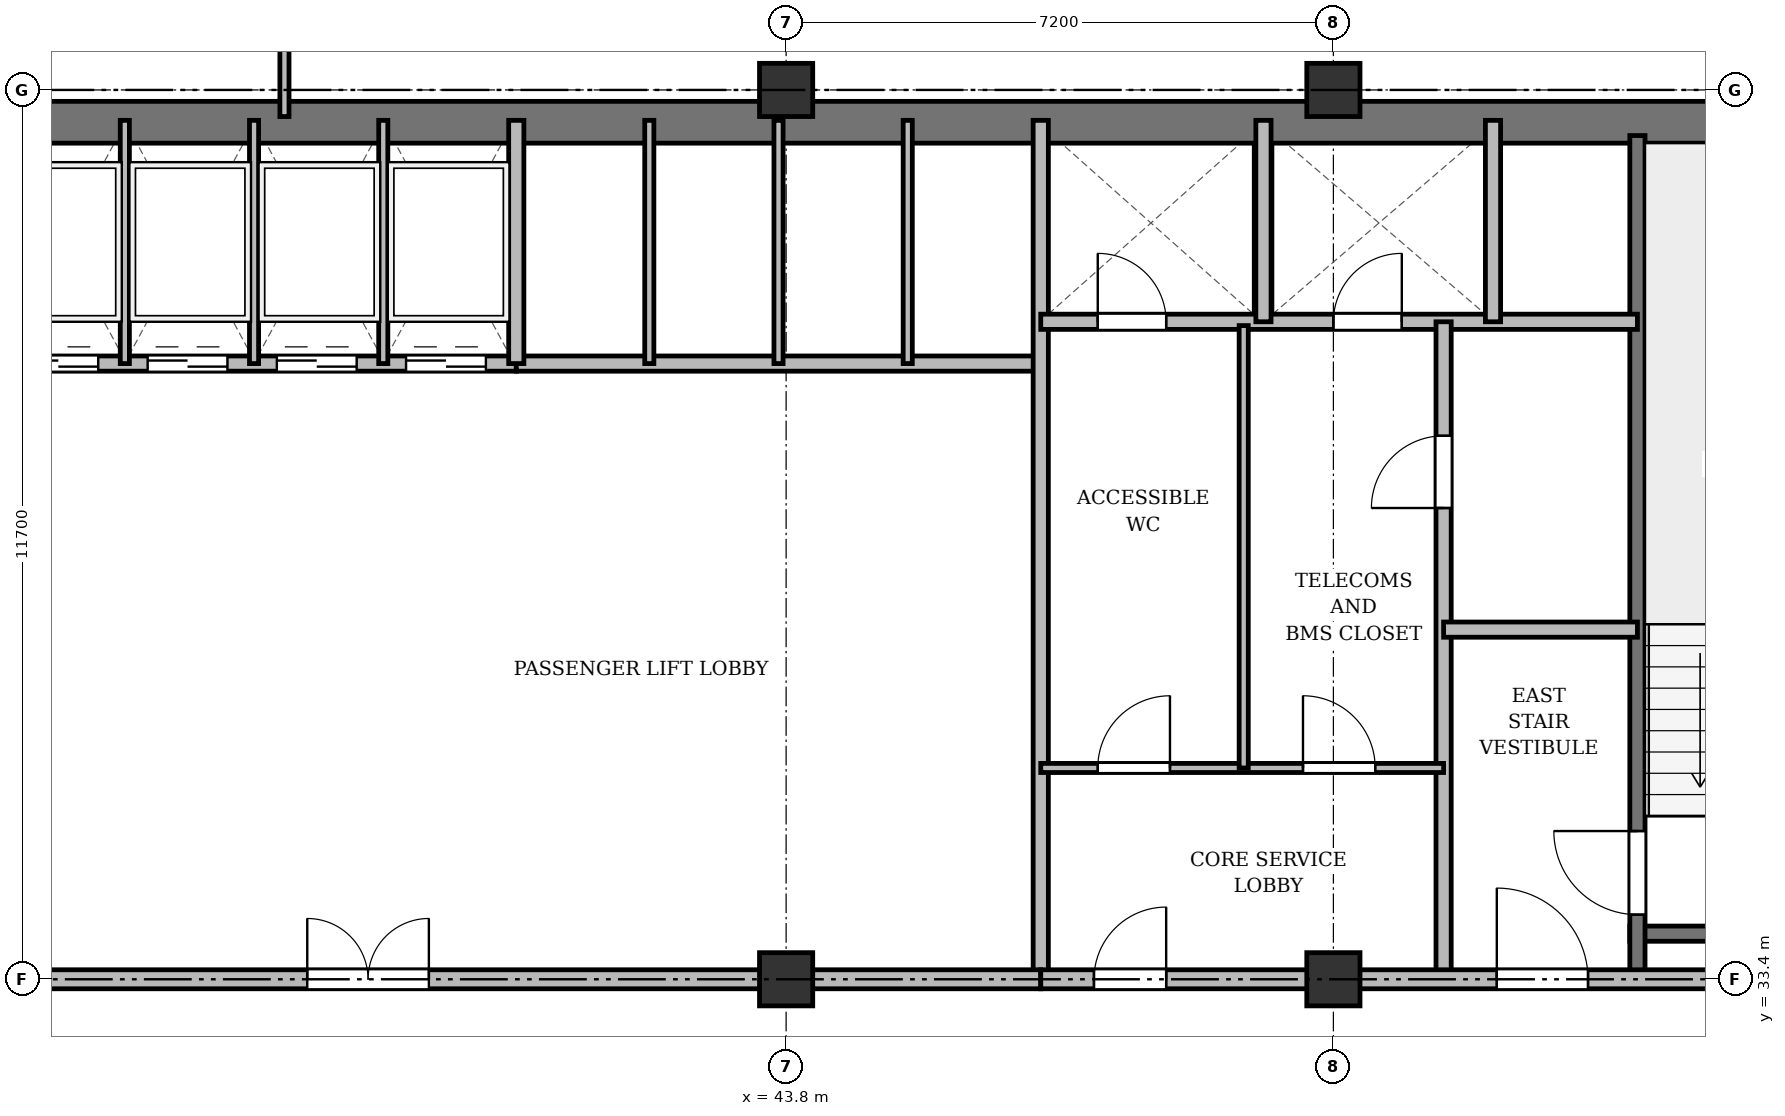
"""IFC4 building model, lengths in metres.
Left out: names, types, materials, properties, quantities, classifications, styles, units other than length and angle.
Written with IfcOpenShell. Run it as: python <this file> out.ifc"""

import sys

from ifc_helpers import new_model, si_unit, direction, frame, frame_2d, origin, origin_2d, place, context, subcontext, project, spatial, rectangle, extrude, source, transform, mapped, element, fill, save


model = new_model("IFC4")
c1 = context("Model", 3, precision=1e-05, world=origin(), true_north=direction((0.0, 1.0)))
c2 = subcontext(c1, "Body", "Model", "MODEL_VIEW")
j1 = project(units=[si_unit("LENGTHUNIT", "METRE"), si_unit("PLANEANGLEUNIT", "RADIAN")], contexts=[c1])
p1 = place(None, origin())
s1 = spatial("IfcSite", under=j1, at=p1, CompositionType="ELEMENT")
p2 = place(p1, origin())
s2 = spatial("IfcBuilding", under=s1, at=p2, CompositionType="ELEMENT")
p3 = place(p2, frame((0.0, 0.0, 171.7)))
s3 = spatial("IfcBuildingStorey", under=s2, at=p3, CompositionType="ELEMENT", Elevation=171.7)
m1 = source(origin(), c2, "Body", "SweptSolid", [
    extrude(rectangle(XDim=0.7, YDim=0.7, at=origin_2d()), origin(), (0.0, 0.0, 1.0), 3.6),
])
for number, where, z_axis, x_axis in (
    (1, (43.8, 33.4, 0.0), (0.0, 0.0, 1.0), (1.0, 0.0, 0.0)),
    (2, (43.8, 45.1, 0.0), (0.0, 0.0, 1.0), (1.0, 0.0, 0.0)),
    (3, (51.0, 33.4, 0.0), (0.0, 0.0, 1.0), (1.0, 0.0, 0.0)),
    (4, (51.0, 45.1, 0.0), (0.0, 0.0, 1.0), (1.0, 0.0, 0.0)),
):
    element("IfcColumn", number, at=place(p3, frame(where, z_axis=z_axis, x_axis=x_axis)), inside=s3, PredefinedType="COLUMN", context=c2, shape_type="MappedRepresentation", body=[
        mapped(m1, transform((0.0, 0.0, 0.0), x_axis=(1.0, 0.0, 0.0), y_axis=(0.0, 1.0, 0.0), z_axis=(0.0, 0.0, 1.0), scale=1.0)),
    ])
p4 = place(p3, frame((15.65, 44.675, 0.0), z_axis=(0.0, 0.0, 1.0), x_axis=(1.0, 0.0, 0.0)))
e5 = element("IfcWall", 5, at=p4, inside=s3, PredefinedType="SHEAR", context=c2, shape_type="SweptSolid", body=[
    extrude(rectangle(XDim=43.1, YDim=0.55, at=frame_2d((21.55, 0.0))), origin(), (0.0, 0.0, 1.0), 3.35),
])
p5 = place(p3, frame((54.9, 34.0, 0.0), z_axis=(0.0, 0.0, 1.0), x_axis=(1.0, 0.0, 0.0)))
e6 = element("IfcWall", 6, at=p5, inside=s3, PredefinedType="SHEAR", context=c2, shape_type="SweptSolid", body=[
    extrude(rectangle(XDim=3.4, YDim=0.2, at=frame_2d((1.7, 0.0))), origin(), (0.0, 0.0, 1.0), 3.35),
])
p6 = place(p3, frame((55.0, 33.4, 0.0), z_axis=(0.0, 0.0, 1.0), x_axis=(0.0, 1.0, 0.0)))
e7 = element("IfcWall", 7, at=p6, inside=s3, PredefinedType="SHEAR", context=c2, shape_type="SweptSolid", body=[
    extrude(rectangle(XDim=11.1, YDim=0.2, at=frame_2d((5.55, 0.0))), origin(), (0.0, 0.0, 1.0), 3.35),
])
p7 = place(p6, frame((0.85, 0.0, 0.0)))
e8 = element("IfcOpeningElement", 8, at=p7, cuts=e7, PredefinedType="OPENING", context=c2, shape_type="SweptSolid", body=[
    extrude(rectangle(XDim=1.1, YDim=2.15, at=frame_2d((0.55, 1.075))), frame((0.0, 0.11, 0.0), z_axis=(0.0, -1.0, 0.0), x_axis=(1.0, 0.0, 0.0)), (0.0, 0.0, 1.0), 0.22),
])
p8 = place(p3, frame((33.35, 41.5, 0.0), z_axis=(0.0, 0.0, 1.0), x_axis=(1.0, 0.0, 0.0)))
e9 = element("IfcWall", 9, at=p8, inside=s3, PredefinedType="SOLIDWALL", context=c2, shape_type="SweptSolid", body=[
    extrude(rectangle(XDim=6.9, YDim=0.2, at=frame_2d((3.45, 0.0))), origin(), (0.0, 0.0, 1.0), 3.35),
])
p9 = place(p8, frame((0.35, 0.0, 0.0)))
e10 = element("IfcOpeningElement", 10, at=p9, cuts=e9, PredefinedType="OPENING", context=c2, shape_type="SweptSolid", body=[
    extrude(rectangle(XDim=1.05, YDim=2.15, at=frame_2d((0.525, 1.075))), frame((0.0, 0.11, 0.0), z_axis=(0.0, -1.0, 0.0), x_axis=(1.0, 0.0, 0.0)), (0.0, 0.0, 1.0), 0.22),
])
p10 = place(p8, frame((2.05, 0.0, 0.0)))
e11 = element("IfcOpeningElement", 11, at=p10, cuts=e9, PredefinedType="OPENING", context=c2, shape_type="SweptSolid", body=[
    extrude(rectangle(XDim=1.05, YDim=2.15, at=frame_2d((0.525, 1.075))), frame((0.0, 0.11, 0.0), z_axis=(0.0, -1.0, 0.0), x_axis=(1.0, 0.0, 0.0)), (0.0, 0.0, 1.0), 0.22),
])
p11 = place(p8, frame((3.75, 0.0, 0.0)))
e12 = element("IfcOpeningElement", 12, at=p11, cuts=e9, PredefinedType="OPENING", context=c2, shape_type="SweptSolid", body=[
    extrude(rectangle(XDim=1.05, YDim=2.15, at=frame_2d((0.525, 1.075))), frame((0.0, 0.11, 0.0), z_axis=(0.0, -1.0, 0.0), x_axis=(1.0, 0.0, 0.0)), (0.0, 0.0, 1.0), 0.22),
])
p12 = place(p8, frame((5.45, 0.0, 0.0)))
e13 = element("IfcOpeningElement", 13, at=p12, cuts=e9, PredefinedType="OPENING", context=c2, shape_type="SweptSolid", body=[
    extrude(rectangle(XDim=1.05, YDim=2.15, at=frame_2d((0.525, 1.075))), frame((0.0, 0.11, 0.0), z_axis=(0.0, -1.0, 0.0), x_axis=(1.0, 0.0, 0.0)), (0.0, 0.0, 1.0), 0.22),
])
for number, where, z_axis, x_axis in (
    (14, (35.1, 41.5, 0.0), (0.0, 0.0, 1.0), (0.0, 1.0, 0.0)),
    (15, (36.8, 41.5, 0.0), (0.0, 0.0, 1.0), (0.0, 1.0, 0.0)),
    (16, (38.5, 41.5, 0.0), (0.0, 0.0, 1.0), (0.0, 1.0, 0.0)),
):
    element("IfcWall", number, at=place(p3, frame(where, z_axis=z_axis, x_axis=x_axis)), inside=s3, PredefinedType="PARTITIONING", context=c2, shape_type="SweptSolid", body=[
        extrude(rectangle(XDim=3.2, YDim=0.12, at=frame_2d((1.6, 0.0))), origin(), (0.0, 0.0, 1.0), 3.35),
    ])
p13 = place(p3, frame((40.25, 41.5, 0.0), z_axis=(0.0, 0.0, 1.0), x_axis=(1.0, 0.0, 0.0)))
e17 = element("IfcWall", 17, at=p13, inside=s3, PredefinedType="SOLIDWALL", context=c2, shape_type="SweptSolid", body=[
    extrude(rectangle(XDim=6.9, YDim=0.2, at=frame_2d((3.45, 0.0))), origin(), (0.0, 0.0, 1.0), 2.85),
])
p14 = place(p3, frame((40.25, 41.5, 0.0), z_axis=(0.0, 0.0, 1.0), x_axis=(0.0, 1.0, 0.0)))
e18 = element("IfcWall", 18, at=p14, inside=s3, PredefinedType="SOLIDWALL", context=c2, shape_type="SweptSolid", body=[
    extrude(rectangle(XDim=3.2, YDim=0.2, at=frame_2d((1.6, 0.0))), origin(), (0.0, 0.0, 1.0), 3.35),
])
p15 = place(p3, frame((42.0, 41.5, 0.0), z_axis=(0.0, 0.0, 1.0), x_axis=(0.0, 1.0, 0.0)))
e19 = element("IfcWall", 19, at=p15, inside=s3, PredefinedType="PARTITIONING", context=c2, shape_type="SweptSolid", body=[
    extrude(rectangle(XDim=3.2, YDim=0.12, at=frame_2d((1.6, 0.0))), origin(), (0.0, 0.0, 1.0), 3.35),
])
p16 = place(p3, frame((43.7, 41.5, 0.0), z_axis=(0.0, 0.0, 1.0), x_axis=(0.0, 1.0, 0.0)))
e20 = element("IfcWall", 20, at=p16, inside=s3, PredefinedType="PARTITIONING", context=c2, shape_type="SweptSolid", body=[
    extrude(rectangle(XDim=3.2, YDim=0.12, at=frame_2d((1.6, 0.0))), origin(), (0.0, 0.0, 1.0), 2.85),
])
p17 = place(p3, frame((45.4, 41.5, 0.0), z_axis=(0.0, 0.0, 1.0), x_axis=(0.0, 1.0, 0.0)))
e21 = element("IfcWall", 21, at=p17, inside=s3, PredefinedType="PARTITIONING", context=c2, shape_type="SweptSolid", body=[
    extrude(rectangle(XDim=3.2, YDim=0.12, at=frame_2d((1.6, 0.0))), origin(), (0.0, 0.0, 1.0), 3.35),
])
p18 = place(p3, frame((47.15, 33.4, 0.0), z_axis=(0.0, 0.0, 1.0), x_axis=(0.0, 1.0, 0.0)))
e22 = element("IfcWall", 22, at=p18, inside=s3, PredefinedType="SOLIDWALL", context=c2, shape_type="SweptSolid", body=[
    extrude(rectangle(XDim=11.3, YDim=0.2, at=frame_2d((5.65, 0.0))), origin(), (0.0, 0.0, 1.0), 2.75),
])
p19 = place(p3, frame((33.3, 33.4, 0.0), z_axis=(0.0, 0.0, 1.0), x_axis=(1.0, 0.0, 0.0)))
e23 = element("IfcWall", 23, at=p19, inside=s3, PredefinedType="PARTITIONING", context=c2, shape_type="SweptSolid", body=[
    extrude(rectangle(XDim=13.85, YDim=0.25, at=frame_2d((6.925, 0.0))), origin(), (0.0, 0.0, 1.0), 2.75),
])
p20 = place(p19, frame((4.2, 0.0, 0.0)))
e24 = element("IfcOpeningElement", 24, at=p20, cuts=e23, PredefinedType="OPENING", context=c2, shape_type="SweptSolid", body=[
    extrude(rectangle(XDim=1.6, YDim=2.2, at=frame_2d((0.8, 1.1))), frame((0.0, 0.135, 0.0), z_axis=(0.0, -1.0, 0.0), x_axis=(1.0, 0.0, 0.0)), (0.0, 0.0, 1.0), 0.27),
])
p21 = place(p3, frame((47.15, 42.05, 0.0), z_axis=(0.0, 0.0, 1.0), x_axis=(1.0, 0.0, 0.0)))
e25 = element("IfcWall", 25, at=p21, inside=s3, PredefinedType="SOLIDWALL", context=c2, shape_type="SweptSolid", body=[
    extrude(rectangle(XDim=7.85, YDim=0.2, at=frame_2d((3.925, 0.0))), origin(), (0.0, 0.0, 1.0), 2.85),
])
p22 = place(p21, frame((0.75, 0.0, 0.0)))
e26 = element("IfcOpeningElement", 26, at=p22, cuts=e25, PredefinedType="OPENING", context=c2, shape_type="SweptSolid", body=[
    extrude(rectangle(XDim=0.9, YDim=2.1, at=frame_2d((0.45, 1.05))), frame((0.0, 0.11, 0.0), z_axis=(0.0, -1.0, 0.0), x_axis=(1.0, 0.0, 0.0)), (0.0, 0.0, 1.0), 0.22),
])
p23 = place(p21, frame((3.85, 0.0, 0.0)))
e27 = element("IfcOpeningElement", 27, at=p23, cuts=e25, PredefinedType="OPENING", context=c2, shape_type="SweptSolid", body=[
    extrude(rectangle(XDim=0.9, YDim=2.1, at=frame_2d((0.45, 1.05))), frame((0.0, 0.11, 0.0), z_axis=(0.0, -1.0, 0.0), x_axis=(1.0, 0.0, 0.0)), (0.0, 0.0, 1.0), 0.22),
])
for number, where, z_axis, x_axis in (
    (28, (50.08, 42.05, 0.0), (0.0, 0.0, 1.0), (0.0, 1.0, 0.0)),
    (29, (53.1, 42.05, 0.0), (0.0, 0.0, 1.0), (0.0, 1.0, 0.0)),
):
    element("IfcWall", number, at=place(p3, frame(where, z_axis=z_axis, x_axis=x_axis)), inside=s3, PredefinedType="SOLIDWALL", context=c2, shape_type="SweptSolid", body=[
        extrude(rectangle(XDim=2.65, YDim=0.2, at=frame_2d((1.325, 0.0))), origin(), (0.0, 0.0, 1.0), 3.35),
    ])
p24 = place(p3, frame((52.45, 33.4, 0.0), z_axis=(0.0, 0.0, 1.0), x_axis=(0.0, 1.0, 0.0)))
e30 = element("IfcWall", 30, at=p24, inside=s3, PredefinedType="PARTITIONING", context=c2, shape_type="SweptSolid", body=[
    extrude(rectangle(XDim=8.65, YDim=0.2, at=frame_2d((4.325, 0.0))), origin(), (0.0, 0.0, 1.0), 2.75),
])
p25 = place(p24, frame((6.2, 0.0, 0.0)))
e31 = element("IfcOpeningElement", 31, at=p25, cuts=e30, PredefinedType="OPENING", context=c2, shape_type="SweptSolid", body=[
    extrude(rectangle(XDim=0.95, YDim=2.15, at=frame_2d((0.475, 1.075))), frame((0.0, 0.11, 0.0), z_axis=(0.0, -1.0, 0.0), x_axis=(1.0, 0.0, 0.0)), (0.0, 0.0, 1.0), 0.22),
])
p26 = place(p3, frame((52.45, 38.0, 0.0), z_axis=(0.0, 0.0, 1.0), x_axis=(1.0, 0.0, 0.0)))
e32 = element("IfcWall", 32, at=p26, inside=s3, PredefinedType="PARTITIONING", context=c2, shape_type="SweptSolid", body=[
    extrude(rectangle(XDim=2.55, YDim=0.2, at=frame_2d((1.275, 0.0))), origin(), (0.0, 0.0, 1.0), 3.35),
])
p27 = place(p3, frame((47.15, 36.18, 0.0), z_axis=(0.0, 0.0, 1.0), x_axis=(1.0, 0.0, 0.0)))
e33 = element("IfcWall", 33, at=p27, inside=s3, PredefinedType="PARTITIONING", context=c2, shape_type="SweptSolid", body=[
    extrude(rectangle(XDim=5.3, YDim=0.12, at=frame_2d((2.65, 0.0))), origin(), (0.0, 0.0, 1.0), 2.85),
])
p28 = place(p27, frame((0.75, 0.0, 0.0)))
e34 = element("IfcOpeningElement", 34, at=p28, cuts=e33, PredefinedType="OPENING", context=c2, shape_type="SweptSolid", body=[
    extrude(rectangle(XDim=0.95, YDim=2.15, at=frame_2d((0.475, 1.075))), frame((0.0, 0.07, 0.0), z_axis=(0.0, -1.0, 0.0), x_axis=(1.0, 0.0, 0.0)), (0.0, 0.0, 1.0), 0.14),
])
p29 = place(p27, frame((3.45, 0.0, 0.0)))
e35 = element("IfcOpeningElement", 35, at=p29, cuts=e33, PredefinedType="OPENING", context=c2, shape_type="SweptSolid", body=[
    extrude(rectangle(XDim=0.95, YDim=2.15, at=frame_2d((0.475, 1.075))), frame((0.0, 0.07, 0.0), z_axis=(0.0, -1.0, 0.0), x_axis=(1.0, 0.0, 0.0)), (0.0, 0.0, 1.0), 0.14),
])
p30 = place(p3, frame((49.82, 36.18, 0.0), z_axis=(0.0, 0.0, 1.0), x_axis=(0.0, 1.0, 0.0)))
e36 = element("IfcWall", 36, at=p30, inside=s3, PredefinedType="PARTITIONING", context=c2, shape_type="SweptSolid", body=[
    extrude(rectangle(XDim=5.82, YDim=0.12, at=frame_2d((2.91, 0.0))), origin(), (0.0, 0.0, 1.0), 3.35),
])
p31 = place(p3, frame((47.15, 33.4, 0.0), z_axis=(0.0, 0.0, 1.0), x_axis=(1.0, 0.0, 0.0)))
e37 = element("IfcWall", 37, at=p31, inside=s3, PredefinedType="PARTITIONING", context=c2, shape_type="SweptSolid", body=[
    extrude(rectangle(XDim=11.15, YDim=0.25, at=frame_2d((5.575, 0.0))), origin(), (0.0, 0.0, 1.0), 2.75),
])
p32 = place(p31, frame((0.7, 0.0, 0.0)))
e38 = element("IfcOpeningElement", 38, at=p32, cuts=e37, PredefinedType="OPENING", context=c2, shape_type="SweptSolid", body=[
    extrude(rectangle(XDim=0.95, YDim=2.15, at=frame_2d((0.475, 1.075))), frame((0.0, 0.135, 0.0), z_axis=(0.0, -1.0, 0.0), x_axis=(1.0, 0.0, 0.0)), (0.0, 0.0, 1.0), 0.27),
])
p33 = place(p31, frame((6.0, 0.0, 0.0)))
e39 = element("IfcOpeningElement", 39, at=p33, cuts=e37, PredefinedType="OPENING", context=c2, shape_type="SweptSolid", body=[
    extrude(rectangle(XDim=1.2, YDim=2.15, at=frame_2d((0.6, 1.075))), frame((0.0, 0.135, 0.0), z_axis=(0.0, -1.0, 0.0), x_axis=(1.0, 0.0, 0.0)), (0.0, 0.0, 1.0), 0.27),
])
p34 = place(p3, frame((37.2, 44.75, 0.0), z_axis=(0.0, 0.0, 1.0), x_axis=(0.0, 1.0, 0.0)))
e40 = element("IfcWall", 40, at=p34, inside=s3, PredefinedType="PARTITIONING", context=c2, shape_type="SweptSolid", body=[
    extrude(rectangle(XDim=3.61, YDim=0.12, at=frame_2d((1.805, 0.0))), origin(), (0.0, 0.0, 1.0), 2.75),
])
p35 = place(p34, frame((1.1, 0.0, 0.0)))
e41 = element("IfcOpeningElement", 41, at=p35, cuts=e40, PredefinedType="OPENING", context=c2, shape_type="SweptSolid", body=[
    extrude(rectangle(XDim=0.95, YDim=2.15, at=frame_2d((0.475, 1.075))), frame((0.0, 0.07, 0.0), z_axis=(0.0, -1.0, 0.0), x_axis=(1.0, 0.0, 0.0)), (0.0, 0.0, 1.0), 0.14),
])
m2 = source(origin(), c2, "Body", "SweptSolid", [
    extrude(rectangle(XDim=1.1, YDim=2.15, at=frame_2d((0.55, 1.075))), frame((0.0, 0.025, 0.0), z_axis=(0.0, -1.0, 0.0), x_axis=(1.0, 0.0, 0.0)), (0.0, 0.0, 1.0), 0.05),
])
p36 = place(p7, origin())
e42 = element("IfcDoor", 42, at=p36, inside=s3, OperationType="SINGLE_SWING_RIGHT", PredefinedType="DOOR", context=c2, shape_type="MappedRepresentation", body=[
    mapped(m2, transform((0.0, 0.0, 0.0), x_axis=(1.0, 0.0, 0.0), y_axis=(0.0, 1.0, 0.0), z_axis=(0.0, 0.0, 1.0), scale=1.0)),
])
fill(e8, e42)
m3 = source(origin(), c2, "Body", "SweptSolid", [
    extrude(rectangle(XDim=1.05, YDim=2.15, at=frame_2d((0.525, 1.075))), frame((0.0, 0.025, 0.0), z_axis=(0.0, -1.0, 0.0), x_axis=(1.0, 0.0, 0.0)), (0.0, 0.0, 1.0), 0.05),
])
p37 = place(p9, origin())
e43 = element("IfcDoor", 43, at=p37, inside=s3, OperationType="DOUBLE_DOOR_SLIDING", PredefinedType="DOOR", context=c2, shape_type="MappedRepresentation", body=[
    mapped(m3, transform((0.0, 0.0, 0.0), x_axis=(1.0, 0.0, 0.0), y_axis=(0.0, 1.0, 0.0), z_axis=(0.0, 0.0, 1.0), scale=1.0)),
])
fill(e10, e43)
p38 = place(p10, origin())
e44 = element("IfcDoor", 44, at=p38, inside=s3, OperationType="DOUBLE_DOOR_SLIDING", PredefinedType="DOOR", context=c2, shape_type="MappedRepresentation", body=[
    mapped(m3, transform((0.0, 0.0, 0.0), x_axis=(1.0, 0.0, 0.0), y_axis=(0.0, 1.0, 0.0), z_axis=(0.0, 0.0, 1.0), scale=1.0)),
])
fill(e11, e44)
p39 = place(p11, origin())
e45 = element("IfcDoor", 45, at=p39, inside=s3, OperationType="DOUBLE_DOOR_SLIDING", PredefinedType="DOOR", context=c2, shape_type="MappedRepresentation", body=[
    mapped(m3, transform((0.0, 0.0, 0.0), x_axis=(1.0, 0.0, 0.0), y_axis=(0.0, 1.0, 0.0), z_axis=(0.0, 0.0, 1.0), scale=1.0)),
])
fill(e12, e45)
p40 = place(p12, origin())
e46 = element("IfcDoor", 46, at=p40, inside=s3, OperationType="DOUBLE_DOOR_SLIDING", PredefinedType="DOOR", context=c2, shape_type="MappedRepresentation", body=[
    mapped(m3, transform((0.0, 0.0, 0.0), x_axis=(1.0, 0.0, 0.0), y_axis=(0.0, 1.0, 0.0), z_axis=(0.0, 0.0, 1.0), scale=1.0)),
])
fill(e13, e46)
m4 = source(origin(), c2, "Body", "SweptSolid", [
    extrude(rectangle(XDim=1.6, YDim=2.2, at=frame_2d((0.8, 1.1))), frame((0.0, 0.025, 0.0), z_axis=(0.0, -1.0, 0.0), x_axis=(1.0, 0.0, 0.0)), (0.0, 0.0, 1.0), 0.05),
])
p41 = place(p20, origin())
e47 = element("IfcDoor", 47, at=p41, inside=s3, OperationType="DOUBLE_DOOR_SINGLE_SWING", PredefinedType="DOOR", context=c2, shape_type="MappedRepresentation", body=[
    mapped(m4, transform((0.0, 0.0, 0.0), x_axis=(1.0, 0.0, 0.0), y_axis=(0.0, 1.0, 0.0), z_axis=(0.0, 0.0, 1.0), scale=1.0)),
])
fill(e24, e47)
m5 = source(origin(), c2, "Body", "SweptSolid", [
    extrude(rectangle(XDim=0.9, YDim=2.1, at=frame_2d((0.45, 1.05))), frame((0.0, 0.025, 0.0), z_axis=(0.0, -1.0, 0.0), x_axis=(1.0, 0.0, 0.0)), (0.0, 0.0, 1.0), 0.05),
])
p42 = place(p22, origin())
e48 = element("IfcDoor", 48, at=p42, inside=s3, OperationType="SINGLE_SWING_LEFT", PredefinedType="DOOR", context=c2, shape_type="MappedRepresentation", body=[
    mapped(m5, transform((0.0, 0.0, 0.0), x_axis=(1.0, 0.0, 0.0), y_axis=(0.0, 1.0, 0.0), z_axis=(0.0, 0.0, 1.0), scale=1.0)),
])
fill(e26, e48)
p43 = place(p23, origin())
e49 = element("IfcDoor", 49, at=p43, inside=s3, OperationType="SINGLE_SWING_RIGHT", PredefinedType="DOOR", context=c2, shape_type="MappedRepresentation", body=[
    mapped(m5, transform((0.0, 0.0, 0.0), x_axis=(1.0, 0.0, 0.0), y_axis=(0.0, 1.0, 0.0), z_axis=(0.0, 0.0, 1.0), scale=1.0)),
])
fill(e27, e49)
m6 = source(origin(), c2, "Body", "SweptSolid", [
    extrude(rectangle(XDim=0.95, YDim=2.15, at=frame_2d((0.475, 1.075))), frame((0.0, 0.025, 0.0), z_axis=(0.0, -1.0, 0.0), x_axis=(1.0, 0.0, 0.0)), (0.0, 0.0, 1.0), 0.05),
])
p44 = place(p25, origin())
e50 = element("IfcDoor", 50, at=p44, inside=s3, OperationType="SINGLE_SWING_LEFT", PredefinedType="DOOR", context=c2, shape_type="MappedRepresentation", body=[
    mapped(m6, transform((0.0, 0.0, 0.0), x_axis=(1.0, 0.0, 0.0), y_axis=(0.0, 1.0, 0.0), z_axis=(0.0, 0.0, 1.0), scale=1.0)),
])
fill(e31, e50)
p45 = place(p28, origin())
e51 = element("IfcDoor", 51, at=p45, inside=s3, OperationType="SINGLE_SWING_RIGHT", PredefinedType="DOOR", context=c2, shape_type="MappedRepresentation", body=[
    mapped(m6, transform((0.0, 0.0, 0.0), x_axis=(1.0, 0.0, 0.0), y_axis=(0.0, 1.0, 0.0), z_axis=(0.0, 0.0, 1.0), scale=1.0)),
])
fill(e34, e51)
p46 = place(p29, origin())
e52 = element("IfcDoor", 52, at=p46, inside=s3, OperationType="SINGLE_SWING_LEFT", PredefinedType="DOOR", context=c2, shape_type="MappedRepresentation", body=[
    mapped(m6, transform((0.0, 0.0, 0.0), x_axis=(1.0, 0.0, 0.0), y_axis=(0.0, 1.0, 0.0), z_axis=(0.0, 0.0, 1.0), scale=1.0)),
])
fill(e35, e52)
p47 = place(p32, origin())
e53 = element("IfcDoor", 53, at=p47, inside=s3, OperationType="SINGLE_SWING_RIGHT", PredefinedType="DOOR", context=c2, shape_type="MappedRepresentation", body=[
    mapped(m6, transform((0.0, 0.0, 0.0), x_axis=(1.0, 0.0, 0.0), y_axis=(0.0, 1.0, 0.0), z_axis=(0.0, 0.0, 1.0), scale=1.0)),
])
fill(e38, e53)
m7 = source(origin(), c2, "Body", "SweptSolid", [
    extrude(rectangle(XDim=1.2, YDim=2.15, at=frame_2d((0.6, 1.075))), frame((0.0, 0.025, 0.0), z_axis=(0.0, -1.0, 0.0), x_axis=(1.0, 0.0, 0.0)), (0.0, 0.0, 1.0), 0.05),
])
p48 = place(p33, origin())
e54 = element("IfcDoor", 54, at=p48, inside=s3, OperationType="SINGLE_SWING_LEFT", PredefinedType="DOOR", context=c2, shape_type="MappedRepresentation", body=[
    mapped(m7, transform((0.0, 0.0, 0.0), x_axis=(1.0, 0.0, 0.0), y_axis=(0.0, 1.0, 0.0), z_axis=(0.0, 0.0, 1.0), scale=1.0)),
])
fill(e39, e54)
save(model, sys.argv[1])
